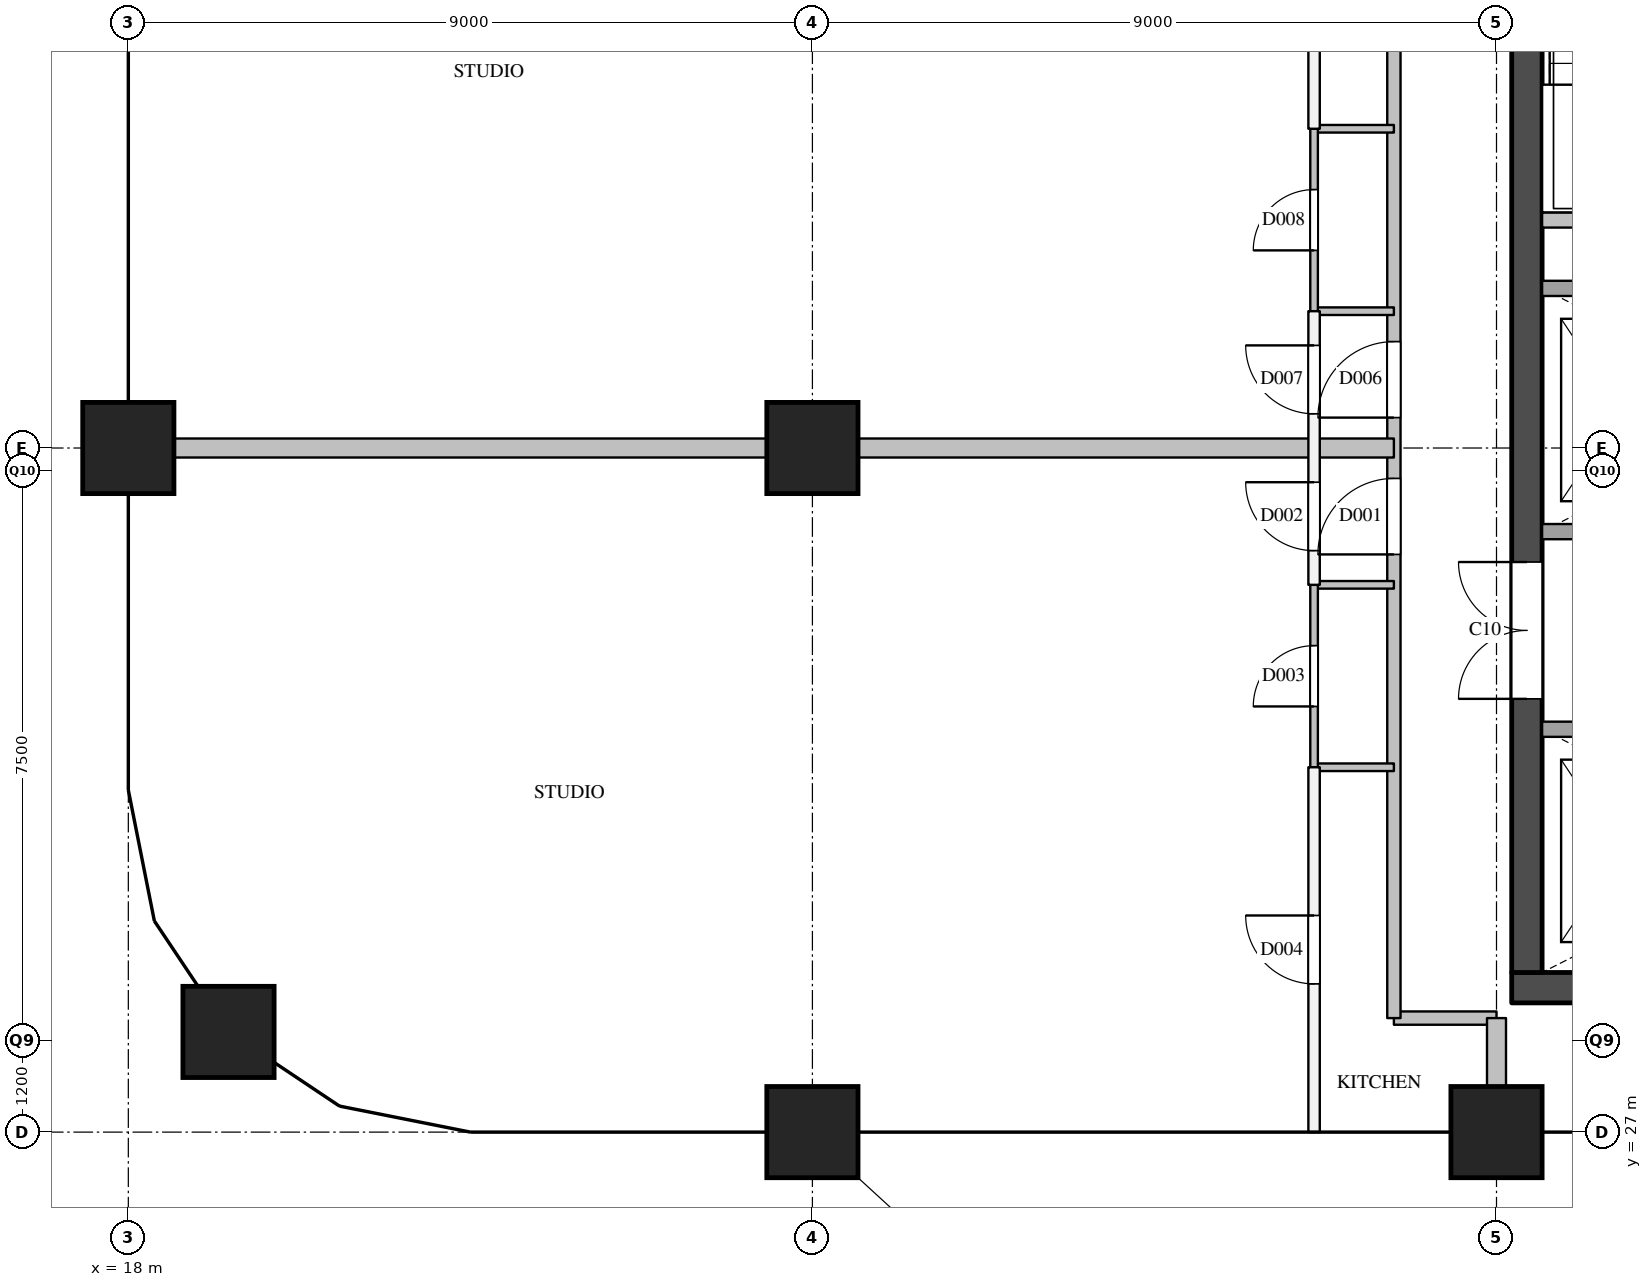
"""IFC4 building model, lengths in metres.
Left out: names, types, materials, properties, quantities, classifications, styles, units other than length and angle.
Written with IfcOpenShell. Run it as: python <this file> out.ifc"""

import sys

from ifc_helpers import new_model, si_unit, direction, frame, frame_2d, origin, origin_2d, place, context, subcontext, project, spatial, rectangle, extrude, element, fill, save


model = new_model("IFC4")
c1 = context("Model", 3, precision=1e-05, world=origin(), true_north=direction((0.0, 1.0)))
c2 = subcontext(c1, "Body", "Model", "MODEL_VIEW")
j1 = project(units=[si_unit("LENGTHUNIT", "METRE"), si_unit("PLANEANGLEUNIT", "RADIAN")], contexts=[c1])
p1 = place(None, origin())
s1 = spatial("IfcSite", under=j1, at=p1, CompositionType="ELEMENT")
p2 = place(p1, origin())
s2 = spatial("IfcBuilding", under=s1, at=p2, CompositionType="ELEMENT")
p3 = place(p2, frame((0.0, 0.0, 269.6)))
s3 = spatial("IfcBuildingStorey", under=s2, at=p3, CompositionType="ELEMENT", Elevation=269.6)
for number, where, z_axis, x_axis in (
    (1, (19.318, 28.318, 0.0), (0.0, 0.0, 1.0), (1.0, 0.0, 0.0)),
    (2, (18.0, 36.0, 0.0), (0.0, 0.0, 1.0), (1.0, 0.0, 0.0)),
    (3, (27.0, 27.0, 0.0), (0.0, 0.0, 1.0), (1.0, 0.0, 0.0)),
    (4, (27.0, 36.0, 0.0), (0.0, 0.0, 1.0), (1.0, 0.0, 0.0)),
    (5, (36.0, 27.0, 0.0), (0.0, 0.0, 1.0), (1.0, 0.0, 0.0)),
):
    element("IfcColumn", number, at=place(p3, frame(where, z_axis=z_axis, x_axis=x_axis)), inside=s3, PredefinedType="COLUMN", context=c2, shape_type="SweptSolid", body=[
        extrude(rectangle(XDim=1.2, YDim=1.2, at=origin_2d()), origin(), (0.0, 0.0, 1.0), 3.9),
    ])
p4 = place(p3, frame((36.2, 28.9, 0.0), z_axis=(0.0, 0.0, 1.0), x_axis=(1.0, 0.0, 0.0)))
e6 = element("IfcWall", 6, at=p4, inside=s3, PredefinedType="SHEAR", context=c2, shape_type="SweptSolid", body=[
    extrude(rectangle(XDim=12.0, YDim=0.4, at=frame_2d((6.0, 0.0))), origin(), (0.0, 0.0, 1.0), 3.6),
])
p5 = place(p4, frame((0.85, 0.0, 0.0)))
e7 = element("IfcOpeningElement", 7, at=p5, cuts=e6, PredefinedType="OPENING", context=c2, shape_type="SweptSolid", body=[
    extrude(rectangle(XDim=1.2, YDim=2.1, at=frame_2d((0.6, 1.05))), frame((0.0, 0.21, 0.0), z_axis=(0.0, -1.0, 0.0), x_axis=(1.0, 0.0, 0.0)), (0.0, 0.0, 1.0), 0.42),
])
p6 = place(p4, frame((2.95, 0.0, 0.0)))
e8 = element("IfcOpeningElement", 8, at=p6, cuts=e6, PredefinedType="OPENING", context=c2, shape_type="SweptSolid", body=[
    extrude(rectangle(XDim=1.2, YDim=2.1, at=frame_2d((0.6, 1.05))), frame((0.0, 0.21, 0.0), z_axis=(0.0, -1.0, 0.0), x_axis=(1.0, 0.0, 0.0)), (0.0, 0.0, 1.0), 0.42),
])
p7 = place(p4, frame((5.05, 0.0, 0.0)))
e9 = element("IfcOpeningElement", 9, at=p7, cuts=e6, PredefinedType="OPENING", context=c2, shape_type="SweptSolid", body=[
    extrude(rectangle(XDim=1.2, YDim=2.1, at=frame_2d((0.6, 1.05))), frame((0.0, 0.21, 0.0), z_axis=(0.0, -1.0, 0.0), x_axis=(1.0, 0.0, 0.0)), (0.0, 0.0, 1.0), 0.42),
])
p8 = place(p3, frame((36.4, 29.1, 0.0), z_axis=(0.0, 0.0, 1.0), x_axis=(0.0, 1.0, 0.0)))
e10 = element("IfcWall", 10, at=p8, inside=s3, PredefinedType="SHEAR", context=c2, shape_type="SweptSolid", body=[
    extrude(rectangle(XDim=20.3, YDim=0.4, at=frame_2d((10.15, 0.0))), origin(), (0.0, 0.0, 1.0), 3.6),
])
p9 = place(p8, frame((3.6, 0.0, 0.0)))
e11 = element("IfcOpeningElement", 11, at=p9, cuts=e10, PredefinedType="OPENING", context=c2, shape_type="SweptSolid", body=[
    extrude(rectangle(XDim=1.8, YDim=2.1, at=frame_2d((0.9, 1.05))), frame((0.0, 0.21, 0.0), z_axis=(0.0, -1.0, 0.0), x_axis=(1.0, 0.0, 0.0)), (0.0, 0.0, 1.0), 0.42),
])
p10 = place(p8, frame((16.4, 0.0, 0.0)))
e12 = element("IfcOpeningElement", 12, at=p10, cuts=e10, PredefinedType="OPENING", context=c2, shape_type="SweptSolid", body=[
    extrude(rectangle(XDim=1.0, YDim=2.1, at=frame_2d((0.5, 1.05))), frame((0.0, 0.21, 0.0), z_axis=(0.0, -1.0, 0.0), x_axis=(1.0, 0.0, 0.0)), (0.0, 0.0, 1.0), 0.42),
])
p11 = place(p3, frame((36.6, 32.3, 0.0), z_axis=(0.0, 0.0, 1.0), x_axis=(1.0, 0.0, 0.0)))
e13 = element("IfcWall", 13, at=p11, inside=s3, PredefinedType="SOLIDWALL", context=c2, shape_type="SweptSolid", body=[
    extrude(rectangle(XDim=11.2, YDim=0.2, at=frame_2d((5.6, 0.0))), origin(), (0.0, 0.0, 1.0), 3.6),
])
p12 = place(p11, frame((7.225, 0.0, 0.0)))
e14 = element("IfcOpeningElement", 14, at=p12, cuts=e13, PredefinedType="OPENING", context=c2, shape_type="SweptSolid", body=[
    extrude(rectangle(XDim=1.2, YDim=2.1, at=frame_2d((0.6, 1.05))), frame((0.0, 0.11, 0.0), z_axis=(0.0, -1.0, 0.0), x_axis=(1.0, 0.0, 0.0)), (0.0, 0.0, 1.0), 0.22),
])
p13 = place(p11, frame((9.475, 0.0, 0.0)))
e15 = element("IfcOpeningElement", 15, at=p13, cuts=e13, PredefinedType="OPENING", context=c2, shape_type="SweptSolid", body=[
    extrude(rectangle(XDim=1.2, YDim=2.1, at=frame_2d((0.6, 1.05))), frame((0.0, 0.11, 0.0), z_axis=(0.0, -1.0, 0.0), x_axis=(1.0, 0.0, 0.0)), (0.0, 0.0, 1.0), 0.22),
])
p14 = place(p3, frame((36.6, 34.9, 0.0), z_axis=(0.0, 0.0, 1.0), x_axis=(1.0, 0.0, 0.0)))
e16 = element("IfcWall", 16, at=p14, inside=s3, PredefinedType="SOLIDWALL", context=c2, shape_type="SweptSolid", body=[
    extrude(rectangle(XDim=6.3, YDim=0.2, at=frame_2d((3.15, 0.0))), origin(), (0.0, 0.0, 1.0), 3.6),
])
p15 = place(p3, frame((36.6, 38.1, 0.0), z_axis=(0.0, 0.0, 1.0), x_axis=(1.0, 0.0, 0.0)))
e17 = element("IfcWall", 17, at=p15, inside=s3, PredefinedType="SOLIDWALL", context=c2, shape_type="SweptSolid", body=[
    extrude(rectangle(XDim=6.7, YDim=0.2, at=frame_2d((3.35, 0.0))), origin(), (0.0, 0.0, 1.0), 3.6),
])
p16 = place(p15, frame((0.45, 0.0, 0.0)))
e18 = element("IfcOpeningElement", 18, at=p16, cuts=e17, PredefinedType="OPENING", context=c2, shape_type="SweptSolid", body=[
    extrude(rectangle(XDim=1.2, YDim=2.1, at=frame_2d((0.6, 1.05))), frame((0.0, 0.11, 0.0), z_axis=(0.0, -1.0, 0.0), x_axis=(1.0, 0.0, 0.0)), (0.0, 0.0, 1.0), 0.22),
])
p17 = place(p15, frame((2.55, 0.0, 0.0)))
e19 = element("IfcOpeningElement", 19, at=p17, cuts=e17, PredefinedType="OPENING", context=c2, shape_type="SweptSolid", body=[
    extrude(rectangle(XDim=1.2, YDim=2.1, at=frame_2d((0.6, 1.05))), frame((0.0, 0.11, 0.0), z_axis=(0.0, -1.0, 0.0), x_axis=(1.0, 0.0, 0.0)), (0.0, 0.0, 1.0), 0.22),
])
p18 = place(p15, frame((4.65, 0.0, 0.0)))
e20 = element("IfcOpeningElement", 20, at=p18, cuts=e17, PredefinedType="OPENING", context=c2, shape_type="SweptSolid", body=[
    extrude(rectangle(XDim=1.2, YDim=2.1, at=frame_2d((0.6, 1.05))), frame((0.0, 0.11, 0.0), z_axis=(0.0, -1.0, 0.0), x_axis=(1.0, 0.0, 0.0)), (0.0, 0.0, 1.0), 0.22),
])
p19 = place(p3, frame((36.6, 39.0, 0.0), z_axis=(0.0, 0.0, 1.0), x_axis=(1.0, 0.0, 0.0)))
e21 = element("IfcWall", 21, at=p19, inside=s3, PredefinedType="SOLIDWALL", context=c2, shape_type="SweptSolid", body=[
    extrude(rectangle(XDim=3.25, YDim=0.2, at=frame_2d((1.625, 0.0))), origin(), (0.0, 0.0, 1.0), 3.6),
])
p20 = place(p3, frame((34.65, 28.5, 0.0), z_axis=(0.0, 0.0, 1.0), x_axis=(1.0, 0.0, 0.0)))
e22 = element("IfcWall", 22, at=p20, inside=s3, PredefinedType="PARTITIONING", context=c2, shape_type="SweptSolid", body=[
    extrude(rectangle(XDim=1.35, YDim=0.175, at=frame_2d((0.675, 0.0))), origin(), (0.0, 0.0, 1.0), 3.6),
])
p21 = place(p3, frame((34.65, 28.5, 0.0), z_axis=(0.0, 0.0, 1.0), x_axis=(0.0, 1.0, 0.0)))
e23 = element("IfcWall", 23, at=p21, inside=s3, PredefinedType="PARTITIONING", context=c2, shape_type="SweptSolid", body=[
    extrude(rectangle(XDim=22.85, YDim=0.175, at=frame_2d((11.425, 0.0))), origin(), (0.0, 0.0, 1.0), 3.6),
])
p22 = place(p21, frame((6.1, 0.0, 0.0)))
e24 = element("IfcOpeningElement", 24, at=p22, cuts=e23, PredefinedType="OPENING", context=c2, shape_type="SweptSolid", body=[
    extrude(rectangle(XDim=1.0, YDim=2.1, at=frame_2d((0.5, 1.05))), frame((0.0, 0.097, 0.0), z_axis=(0.0, -1.0, 0.0), x_axis=(1.0, 0.0, 0.0)), (0.0, 0.0, 1.0), 0.195),
])
p23 = place(p21, frame((7.9, 0.0, 0.0)))
e25 = element("IfcOpeningElement", 25, at=p23, cuts=e23, PredefinedType="OPENING", context=c2, shape_type="SweptSolid", body=[
    extrude(rectangle(XDim=1.0, YDim=2.1, at=frame_2d((0.5, 1.05))), frame((0.0, 0.097, 0.0), z_axis=(0.0, -1.0, 0.0), x_axis=(1.0, 0.0, 0.0)), (0.0, 0.0, 1.0), 0.195),
])
p24 = place(p3, frame((33.6, 27.0, 0.0), z_axis=(0.0, 0.0, 1.0), x_axis=(0.0, 1.0, 0.0)))
e26 = element("IfcWall", 26, at=p24, inside=s3, PredefinedType="PARTITIONING", context=c2, shape_type="SweptSolid", body=[
    extrude(rectangle(XDim=4.8, YDim=0.15, at=frame_2d((2.4, 0.0))), origin(), (0.0, 0.0, 1.0), 2.6),
])
p25 = place(p24, frame((1.95, 0.0, 0.0)))
e27 = element("IfcOpeningElement", 27, at=p25, cuts=e26, PredefinedType="OPENING", context=c2, shape_type="SweptSolid", body=[
    extrude(rectangle(XDim=0.9, YDim=2.1, at=frame_2d((0.45, 1.05))), frame((0.0, 0.085, 0.0), z_axis=(0.0, -1.0, 0.0), x_axis=(1.0, 0.0, 0.0)), (0.0, 0.0, 1.0), 0.17),
])
p26 = place(p3, frame((33.6, 34.2, 0.0), z_axis=(0.0, 0.0, 1.0), x_axis=(0.0, 1.0, 0.0)))
e28 = element("IfcWall", 28, at=p26, inside=s3, PredefinedType="PARTITIONING", context=c2, shape_type="SweptSolid", body=[
    extrude(rectangle(XDim=3.6, YDim=0.15, at=frame_2d((1.8, 0.0))), origin(), (0.0, 0.0, 1.0), 3.6),
])
p27 = place(p26, frame((0.45, 0.0, 0.0)))
e29 = element("IfcOpeningElement", 29, at=p27, cuts=e28, PredefinedType="OPENING", context=c2, shape_type="SweptSolid", body=[
    extrude(rectangle(XDim=0.9, YDim=2.1, at=frame_2d((0.45, 1.05))), frame((0.0, 0.085, 0.0), z_axis=(0.0, -1.0, 0.0), x_axis=(1.0, 0.0, 0.0)), (0.0, 0.0, 1.0), 0.17),
])
p28 = place(p26, frame((2.25, 0.0, 0.0)))
e30 = element("IfcOpeningElement", 30, at=p28, cuts=e28, PredefinedType="OPENING", context=c2, shape_type="SweptSolid", body=[
    extrude(rectangle(XDim=0.9, YDim=2.1, at=frame_2d((0.45, 1.05))), frame((0.0, 0.085, 0.0), z_axis=(0.0, -1.0, 0.0), x_axis=(1.0, 0.0, 0.0)), (0.0, 0.0, 1.0), 0.17),
])
p29 = place(p3, frame((33.6, 40.2, 0.0), z_axis=(0.0, 0.0, 1.0), x_axis=(0.0, 1.0, 0.0)))
e31 = element("IfcWall", 31, at=p29, inside=s3, PredefinedType="PARTITIONING", context=c2, shape_type="SweptSolid", body=[
    extrude(rectangle(XDim=13.8, YDim=0.15, at=frame_2d((6.9, 0.0))), origin(), (0.0, 0.0, 1.0), 2.6),
])
p30 = place(p29, frame((6.45, 0.0, 0.0)))
e32 = element("IfcOpeningElement", 32, at=p30, cuts=e31, PredefinedType="OPENING", context=c2, shape_type="SweptSolid", body=[
    extrude(rectangle(XDim=0.9, YDim=2.1, at=frame_2d((0.45, 1.05))), frame((0.0, 0.085, 0.0), z_axis=(0.0, -1.0, 0.0), x_axis=(1.0, 0.0, 0.0)), (0.0, 0.0, 1.0), 0.17),
])
p31 = place(p3, frame((18.0, 36.0, 0.0), z_axis=(0.0, 0.0, 1.0), x_axis=(1.0, 0.0, 0.0)))
e33 = element("IfcWall", 33, at=p31, inside=s3, PredefinedType="PARTITIONING", context=c2, shape_type="SweptSolid", body=[
    extrude(rectangle(XDim=16.65, YDim=0.25, at=frame_2d((8.325, 0.0))), origin(), (0.0, 0.0, 1.0), 3.6),
])
p32 = place(p3, frame((36.0, 27.0, 0.0), z_axis=(0.0, 0.0, 1.0), x_axis=(0.0, 1.0, 0.0)))
e34 = element("IfcWall", 34, at=p32, inside=s3, PredefinedType="PARTITIONING", context=c2, shape_type="SweptSolid", body=[
    extrude(rectangle(XDim=1.5, YDim=0.25, at=frame_2d((0.75, 0.0))), origin(), (0.0, 0.0, 1.0), 3.6),
])
for number, where, z_axis, x_axis in (
    (35, (33.6, 31.8, 0.0), (0.0, 0.0, 1.0), (1.0, 0.0, 0.0)),
    (36, (33.6, 34.2, 0.0), (0.0, 0.0, 1.0), (1.0, 0.0, 0.0)),
    (37, (33.6, 37.8, 0.0), (0.0, 0.0, 1.0), (1.0, 0.0, 0.0)),
    (38, (33.6, 40.2, 0.0), (0.0, 0.0, 1.0), (1.0, 0.0, 0.0)),
):
    element("IfcWall", number, at=place(p3, frame(where, z_axis=z_axis, x_axis=x_axis)), inside=s3, PredefinedType="PARTITIONING", context=c2, shape_type="SweptSolid", body=[
        extrude(rectangle(XDim=1.05, YDim=0.1, at=frame_2d((0.525, 0.0))), origin(), (0.0, 0.0, 1.0), 3.6),
    ])
p33 = place(p3, frame((33.6, 31.8, 0.0), z_axis=(0.0, 0.0, 1.0), x_axis=(0.0, 1.0, 0.0)))
e39 = element("IfcWall", 39, at=p33, inside=s3, PredefinedType="PARTITIONING", context=c2, shape_type="SweptSolid", body=[
    extrude(rectangle(XDim=2.4, YDim=0.1, at=frame_2d((1.2, 0.0))), origin(), (0.0, 0.0, 1.0), 3.6),
])
p34 = place(p33, frame((0.8, 0.0, 0.0)))
e40 = element("IfcOpeningElement", 40, at=p34, cuts=e39, PredefinedType="OPENING", context=c2, shape_type="SweptSolid", body=[
    extrude(rectangle(XDim=0.8, YDim=2.1, at=frame_2d((0.4, 1.05))), frame((0.0, 0.06, 0.0), z_axis=(0.0, -1.0, 0.0), x_axis=(1.0, 0.0, 0.0)), (0.0, 0.0, 1.0), 0.12),
])
p35 = place(p3, frame((33.6, 37.8, 0.0), z_axis=(0.0, 0.0, 1.0), x_axis=(0.0, 1.0, 0.0)))
e41 = element("IfcWall", 41, at=p35, inside=s3, PredefinedType="PARTITIONING", context=c2, shape_type="SweptSolid", body=[
    extrude(rectangle(XDim=2.4, YDim=0.1, at=frame_2d((1.2, 0.0))), origin(), (0.0, 0.0, 1.0), 3.6),
])
p36 = place(p35, frame((0.8, 0.0, 0.0)))
e42 = element("IfcOpeningElement", 42, at=p36, cuts=e41, PredefinedType="OPENING", context=c2, shape_type="SweptSolid", body=[
    extrude(rectangle(XDim=0.8, YDim=2.1, at=frame_2d((0.4, 1.05))), frame((0.0, 0.06, 0.0), z_axis=(0.0, -1.0, 0.0), x_axis=(1.0, 0.0, 0.0)), (0.0, 0.0, 1.0), 0.12),
])
p37 = place(p9, origin())
e43 = element("IfcDoor", 43, at=p37, inside=s3, OperationType="DOUBLE_DOOR_SINGLE_SWING", PredefinedType="DOOR", context=c2, shape_type="SweptSolid", body=[
    extrude(rectangle(XDim=1.8, YDim=2.1, at=frame_2d((0.9, 1.05))), frame((0.0, 0.025, 0.0), z_axis=(0.0, -1.0, 0.0), x_axis=(1.0, 0.0, 0.0)), (0.0, 0.0, 1.0), 0.05),
])
fill(e11, e43)
p38 = place(p22, origin())
e44 = element("IfcDoor", 44, at=p38, inside=s3, OperationType="SINGLE_SWING_LEFT", PredefinedType="DOOR", context=c2, shape_type="SweptSolid", body=[
    extrude(rectangle(XDim=1.0, YDim=2.1, at=frame_2d((0.5, 1.05))), frame((0.0, 0.025, 0.0), z_axis=(0.0, -1.0, 0.0), x_axis=(1.0, 0.0, 0.0)), (0.0, 0.0, 1.0), 0.05),
])
fill(e24, e44)
p39 = place(p27, origin())
e45 = element("IfcDoor", 45, at=p39, inside=s3, OperationType="SINGLE_SWING_RIGHT", PredefinedType="DOOR", context=c2, shape_type="SweptSolid", body=[
    extrude(rectangle(XDim=0.9, YDim=2.1, at=frame_2d((0.45, 1.05))), frame((0.0, 0.025, 0.0), z_axis=(0.0, -1.0, 0.0), x_axis=(1.0, 0.0, 0.0)), (0.0, 0.0, 1.0), 0.05),
])
fill(e29, e45)
p40 = place(p34, origin())
e46 = element("IfcDoor", 46, at=p40, inside=s3, OperationType="SINGLE_SWING_LEFT", PredefinedType="DOOR", context=c2, shape_type="SweptSolid", body=[
    extrude(rectangle(XDim=0.8, YDim=2.1, at=frame_2d((0.4, 1.05))), frame((0.0, 0.025, 0.0), z_axis=(0.0, -1.0, 0.0), x_axis=(1.0, 0.0, 0.0)), (0.0, 0.0, 1.0), 0.05),
])
fill(e40, e46)
p41 = place(p25, origin())
e47 = element("IfcDoor", 47, at=p41, inside=s3, OperationType="SINGLE_SWING_RIGHT", PredefinedType="DOOR", context=c2, shape_type="SweptSolid", body=[
    extrude(rectangle(XDim=0.9, YDim=2.1, at=frame_2d((0.45, 1.05))), frame((0.0, 0.025, 0.0), z_axis=(0.0, -1.0, 0.0), x_axis=(1.0, 0.0, 0.0)), (0.0, 0.0, 1.0), 0.05),
])
fill(e27, e47)
p42 = place(p23, origin())
e48 = element("IfcDoor", 48, at=p42, inside=s3, OperationType="SINGLE_SWING_LEFT", PredefinedType="DOOR", context=c2, shape_type="SweptSolid", body=[
    extrude(rectangle(XDim=1.0, YDim=2.1, at=frame_2d((0.5, 1.05))), frame((0.0, 0.025, 0.0), z_axis=(0.0, -1.0, 0.0), x_axis=(1.0, 0.0, 0.0)), (0.0, 0.0, 1.0), 0.05),
])
fill(e25, e48)
p43 = place(p28, origin())
e49 = element("IfcDoor", 49, at=p43, inside=s3, OperationType="SINGLE_SWING_RIGHT", PredefinedType="DOOR", context=c2, shape_type="SweptSolid", body=[
    extrude(rectangle(XDim=0.9, YDim=2.1, at=frame_2d((0.45, 1.05))), frame((0.0, 0.025, 0.0), z_axis=(0.0, -1.0, 0.0), x_axis=(1.0, 0.0, 0.0)), (0.0, 0.0, 1.0), 0.05),
])
fill(e30, e49)
p44 = place(p36, origin())
e50 = element("IfcDoor", 50, at=p44, inside=s3, OperationType="SINGLE_SWING_LEFT", PredefinedType="DOOR", context=c2, shape_type="SweptSolid", body=[
    extrude(rectangle(XDim=0.8, YDim=2.1, at=frame_2d((0.4, 1.05))), frame((0.0, 0.025, 0.0), z_axis=(0.0, -1.0, 0.0), x_axis=(1.0, 0.0, 0.0)), (0.0, 0.0, 1.0), 0.05),
])
fill(e42, e50)
save(model, sys.argv[1])
